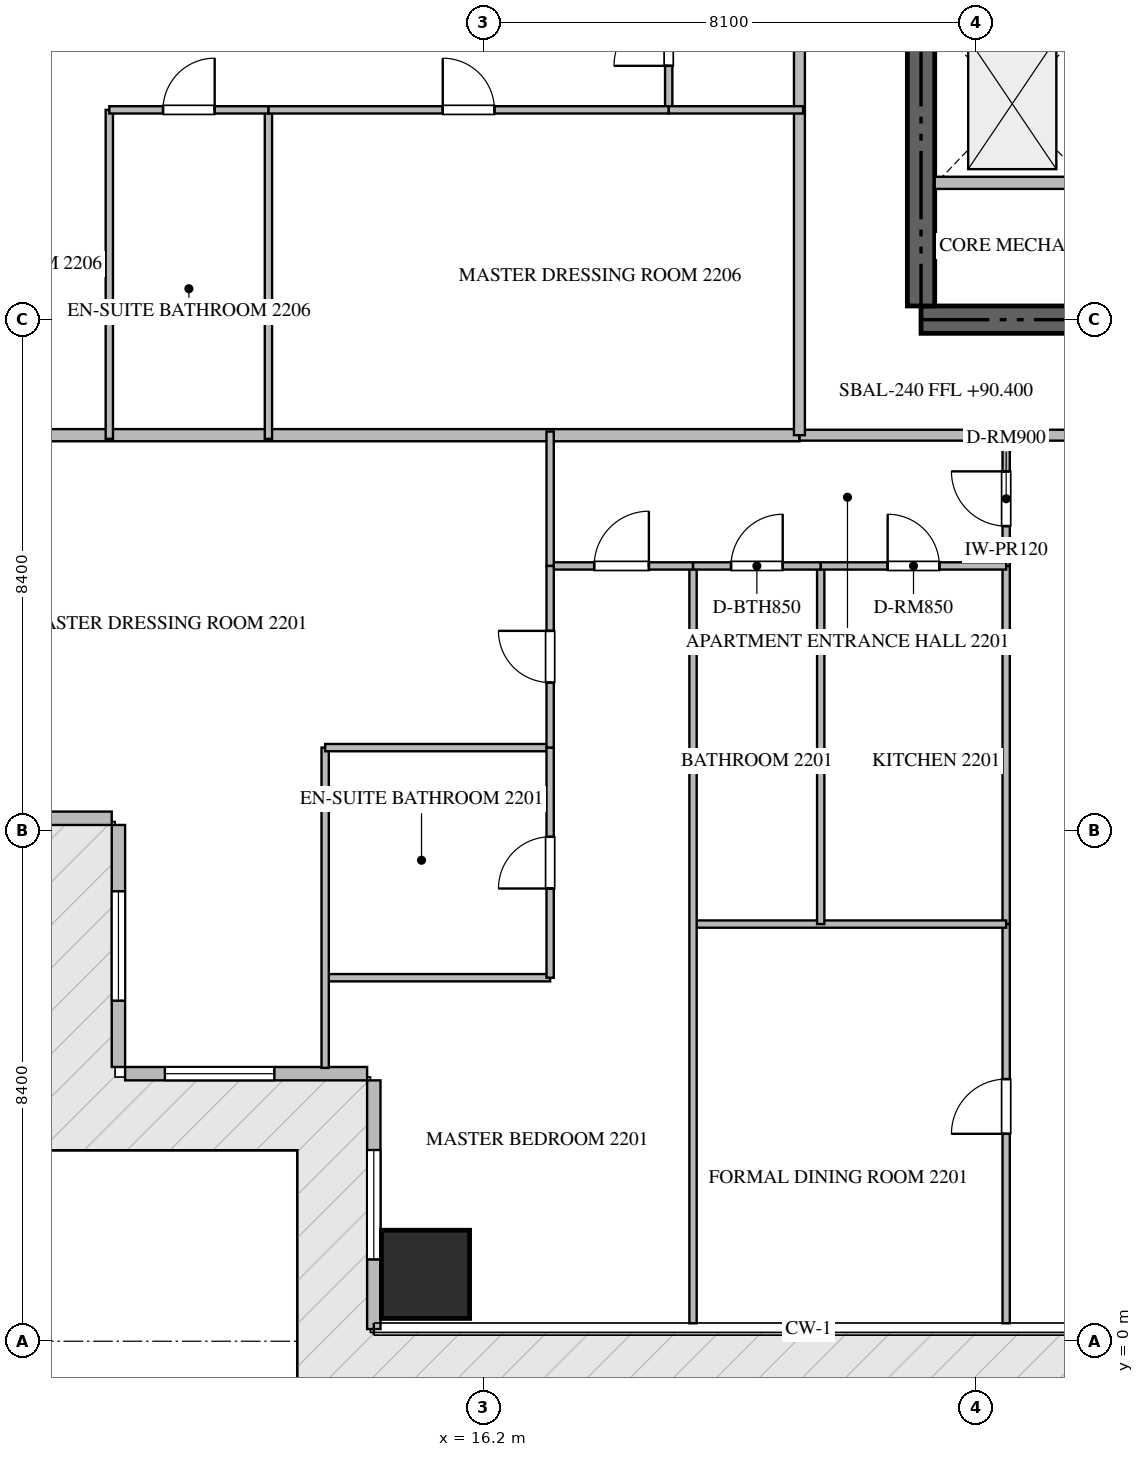
"""IFC4 building model, lengths in metres.
Left out: names, types, materials, properties, quantities, classifications, styles, units other than length and angle.
Written with IfcOpenShell. Run it as: python <this file> out.ifc"""

import sys

from ifc_helpers import new_model, si_unit, direction, frame, frame_2d, origin, origin_2d, place, context, subcontext, project, spatial, rectangle, extrude, source, transform, mapped, element, fill, save


model = new_model("IFC4")
c1 = context("Model", 3, precision=1e-05, world=origin(), true_north=direction((0.0, 1.0)))
c2 = subcontext(c1, "Body", "Model", "MODEL_VIEW")
j1 = project(units=[si_unit("LENGTHUNIT", "METRE"), si_unit("PLANEANGLEUNIT", "RADIAN")], contexts=[c1])
p1 = place(None, origin())
s1 = spatial("IfcSite", under=j1, at=p1, CompositionType="ELEMENT")
p2 = place(p1, origin())
s2 = spatial("IfcBuilding", under=s1, at=p2, CompositionType="ELEMENT")
p3 = place(p2, frame((0.0, 0.0, 90.45)))
s3 = spatial("IfcBuildingStorey", under=s2, at=p3, CompositionType="ELEMENT", Elevation=90.45)
p4 = place(p3, frame((23.4, 16.8, -0.26), z_axis=(0.0, 0.0, 1.0), x_axis=(1.0, 0.0, 0.0)))
e1 = element("IfcWall", 1, at=p4, inside=s3, PredefinedType="SHEAR", context=c2, shape_type="SweptSolid", body=[
    extrude(rectangle(XDim=18.0, YDim=0.45, at=frame_2d((9.0, 0.0))), origin(), (0.0, 0.0, 1.0), 3.748),
])
p5 = place(p3, frame((23.4, 17.025, -0.26), z_axis=(0.0, 0.0, 1.0), x_axis=(0.0, 1.0, 0.0)))
e2 = element("IfcWall", 2, at=p5, inside=s3, PredefinedType="SHEAR", context=c2, shape_type="SweptSolid", body=[
    extrude(rectangle(XDim=4.825, YDim=0.45, at=frame_2d((2.413, 0.0))), origin(), (0.0, 0.0, 1.0), 3.748),
])
m1 = source(origin(), c2, "Body", "SweptSolid", [
    extrude(rectangle(XDim=1.45, YDim=1.45, at=origin_2d()), origin(), (0.0, 0.0, 1.0), 3.75),
])
p6 = place(p3, frame((15.25, 1.1, -0.26), z_axis=(0.0, 0.0, 1.0), x_axis=(1.0, 0.0, 0.0)))
e3 = element("IfcColumn", 3, at=p6, inside=s3, PredefinedType="COLUMN", context=c2, shape_type="MappedRepresentation", body=[
    mapped(m1, transform((0.0, 0.0, 0.0), scale=1.0)),
])
p7 = place(p3, frame((6.0, 8.6, 0.0), z_axis=(0.0, 0.0, 1.0), x_axis=(1.0, 0.0, 0.0)))
e4 = element("IfcWall", 4, at=p7, inside=s3, PredefinedType="ELEMENTEDWALL", context=c2, shape_type="SweptSolid", body=[
    extrude(rectangle(XDim=4.09, YDim=0.22, at=frame_2d((2.045, 0.0))), origin(), (0.0, 0.0, 1.0), 3.475),
])
p8 = place(p7, frame((1.145, 0.0, 0.65)))
e5 = element("IfcOpeningElement", 5, at=p8, cuts=e4, PredefinedType="OPENING", context=c2, shape_type="SweptSolid", body=[
    extrude(rectangle(XDim=1.8, YDim=2.1, at=frame_2d((0.9, 1.05))), frame((0.0, 0.12, 0.0), z_axis=(0.0, -1.0, 0.0), x_axis=(1.0, 0.0, 0.0)), (0.0, 0.0, 1.0), 0.24),
])
p9 = place(p3, frame((10.2, 8.49, 0.0), z_axis=(0.0, 0.0, 1.0), x_axis=(0.0, -1.0, 0.0)))
e6 = element("IfcWall", 6, at=p9, inside=s3, PredefinedType="ELEMENTEDWALL", context=c2, shape_type="SweptSolid", body=[
    extrude(rectangle(XDim=3.98, YDim=0.22, at=frame_2d((1.99, 0.0))), origin(), (0.0, 0.0, 1.0), 3.475),
])
p10 = place(p9, frame((1.09, 0.0, 0.65)))
e7 = element("IfcOpeningElement", 7, at=p10, cuts=e6, PredefinedType="OPENING", context=c2, shape_type="SweptSolid", body=[
    extrude(rectangle(XDim=1.8, YDim=2.1, at=frame_2d((0.9, 1.05))), frame((0.0, 0.12, 0.0), z_axis=(0.0, -1.0, 0.0), x_axis=(1.0, 0.0, 0.0)), (0.0, 0.0, 1.0), 0.24),
])
p11 = place(p3, frame((10.31, 4.4, 0.0), z_axis=(0.0, 0.0, 1.0), x_axis=(1.0, 0.0, 0.0)))
e8 = element("IfcWall", 8, at=p11, inside=s3, PredefinedType="ELEMENTEDWALL", context=c2, shape_type="SweptSolid", body=[
    extrude(rectangle(XDim=3.98, YDim=0.22, at=frame_2d((1.99, 0.0))), origin(), (0.0, 0.0, 1.0), 3.475),
])
p12 = place(p11, frame((0.654, 0.0, 0.65)))
e9 = element("IfcOpeningElement", 9, at=p12, cuts=e8, PredefinedType="OPENING", context=c2, shape_type="SweptSolid", body=[
    extrude(rectangle(XDim=1.8, YDim=2.1, at=frame_2d((0.9, 1.05))), frame((0.0, 0.12, 0.0), z_axis=(0.0, -1.0, 0.0), x_axis=(1.0, 0.0, 0.0)), (0.0, 0.0, 1.0), 0.24),
])
p13 = place(p3, frame((14.4, 4.29, 0.0), z_axis=(0.0, 0.0, 1.0), x_axis=(0.0, -1.0, 0.0)))
e10 = element("IfcWall", 10, at=p13, inside=s3, PredefinedType="ELEMENTEDWALL", context=c2, shape_type="SweptSolid", body=[
    extrude(rectangle(XDim=4.09, YDim=0.22, at=frame_2d((2.045, 0.0))), origin(), (0.0, 0.0, 1.0), 3.475),
])
p14 = place(p13, frame((1.145, 0.0, 0.65)))
e11 = element("IfcOpeningElement", 11, at=p14, cuts=e10, PredefinedType="OPENING", context=c2, shape_type="SweptSolid", body=[
    extrude(rectangle(XDim=1.8, YDim=2.1, at=frame_2d((0.9, 1.05))), frame((0.0, 0.12, 0.0), z_axis=(0.0, -1.0, 0.0), x_axis=(1.0, 0.0, 0.0)), (0.0, 0.0, 1.0), 0.24),
])
p15 = place(p3, frame((23.625, 19.05, 0.0), z_axis=(0.0, 0.0, 1.0), x_axis=(1.0, 0.0, 0.0)))
e12 = element("IfcWall", 12, at=p15, inside=s3, PredefinedType="STANDARD", context=c2, shape_type="SweptSolid", body=[
    extrude(rectangle(XDim=2.425, YDim=0.2, at=frame_2d((1.212, 0.0))), origin(), (0.0, 0.0, 1.0), 3.49),
])
p16 = place(p3, frame((6.082, 14.9, 0.0), z_axis=(0.0, 0.0, 1.0), x_axis=(1.0, 0.0, 0.0)))
e13 = element("IfcWall", 13, at=p16, inside=s3, PredefinedType="PARTITIONING", context=c2, shape_type="SweptSolid", body=[
    extrude(rectangle(XDim=15.318, YDim=0.2, at=frame_2d((7.659, 0.0))), origin(), (0.0, 0.0, 1.0), 3.49),
])
p17 = place(p3, frame((21.402, 14.9, 0.0), z_axis=(0.0, 0.0, 1.0), x_axis=(1.0, 0.0, 0.0)))
e14 = element("IfcWall", 14, at=p17, inside=s3, PredefinedType="PARTITIONING", context=c2, shape_type="SweptSolid", body=[
    extrude(rectangle(XDim=21.996, YDim=0.18, at=frame_2d((10.998, 0.0))), origin(), (0.0, 0.0, 1.0), 3.49),
])
p18 = place(p17, frame((7.202, 0.0, 0.0)))
e15 = element("IfcOpeningElement", 15, at=p18, cuts=e14, PredefinedType="OPENING", context=c2, shape_type="SweptSolid", body=[
    extrude(rectangle(XDim=1.0, YDim=2.15, at=frame_2d((0.5, 1.075))), frame((0.0, 0.1, 0.0), z_axis=(0.0, -1.0, 0.0), x_axis=(1.0, 0.0, 0.0)), (0.0, 0.0, 1.0), 0.2),
])
p19 = place(p3, frame((21.4, 14.9, 0.0), z_axis=(0.0, 0.0, 1.0), x_axis=(0.0, 1.0, 0.0)))
e16 = element("IfcWall", 16, at=p19, inside=s3, PredefinedType="PARTITIONING", context=c2, shape_type="SweptSolid", body=[
    extrude(rectangle(XDim=20.6, YDim=0.18, at=frame_2d((10.3, 0.0))), origin(), (0.0, 0.0, 1.0), 3.49),
])
p20 = place(p19, frame((17.64, 0.0, 0.0)))
e17 = element("IfcOpeningElement", 17, at=p20, cuts=e16, PredefinedType="OPENING", context=c2, shape_type="SweptSolid", body=[
    extrude(rectangle(XDim=1.0, YDim=2.15, at=frame_2d((0.5, 1.075))), frame((0.0, 0.1, 0.0), z_axis=(0.0, -1.0, 0.0), x_axis=(1.0, 0.0, 0.0)), (0.0, 0.0, 1.0), 0.2),
])
p21 = place(p3, frame((24.8, 12.75, 0.0), z_axis=(0.0, 0.0, 1.0), x_axis=(0.0, 1.0, 0.0)))
e18 = element("IfcWall", 18, at=p21, inside=s3, PredefinedType="PARTITIONING", context=c2, shape_type="SweptSolid", body=[
    extrude(rectangle(XDim=2.21, YDim=0.12, at=frame_2d((1.105, 0.0))), origin(), (0.0, 0.0, 1.0), 3.49),
])
p22 = place(p21, frame((0.655, 0.0, 0.0)))
e19 = element("IfcOpeningElement", 19, at=p22, cuts=e18, PredefinedType="OPENING", context=c2, shape_type="SweptSolid", body=[
    extrude(rectangle(XDim=0.9, YDim=2.1, at=frame_2d((0.45, 1.05))), frame((0.0, 0.07, 0.0), z_axis=(0.0, -1.0, 0.0), x_axis=(1.0, 0.0, 0.0)), (0.0, 0.0, 1.0), 0.14),
])
p23 = place(p3, frame((24.8, 0.295, 0.0), z_axis=(0.0, 0.0, 1.0), x_axis=(0.0, 1.0, 0.0)))
e20 = element("IfcWall", 20, at=p23, inside=s3, PredefinedType="PARTITIONING", context=c2, shape_type="SweptSolid", body=[
    extrude(rectangle(XDim=6.565, YDim=0.12, at=frame_2d((3.283, 0.0))), origin(), (0.0, 0.0, 1.0), 3.49),
])
p24 = place(p23, frame((3.116, 0.0, 0.0)))
e21 = element("IfcOpeningElement", 21, at=p24, cuts=e20, PredefinedType="OPENING", context=c2, shape_type="SweptSolid", body=[
    extrude(rectangle(XDim=0.9, YDim=2.1, at=frame_2d((0.45, 1.05))), frame((0.0, 0.07, 0.0), z_axis=(0.0, -1.0, 0.0), x_axis=(1.0, 0.0, 0.0)), (0.0, 0.0, 1.0), 0.14),
])
p25 = place(p3, frame((24.8, 6.862, 0.0), z_axis=(0.0, 0.0, 1.0), x_axis=(0.0, 1.0, 0.0)))
e22 = element("IfcWall", 22, at=p25, inside=s3, PredefinedType="PARTITIONING", context=c2, shape_type="SweptSolid", body=[
    extrude(rectangle(XDim=5.886, YDim=0.12, at=frame_2d((2.943, 0.0))), origin(), (0.0, 0.0, 1.0), 3.49),
])
p26 = place(p3, frame((19.65, 6.86, 0.0), z_axis=(0.0, 0.0, 1.0), x_axis=(1.0, 0.0, 0.0)))
e23 = element("IfcWall", 23, at=p26, inside=s3, PredefinedType="PARTITIONING", context=c2, shape_type="SweptSolid", body=[
    extrude(rectangle(XDim=5.15, YDim=0.12, at=frame_2d((2.575, 0.0))), origin(), (0.0, 0.0, 1.0), 3.49),
])
p27 = place(p3, frame((19.65, 0.295, 0.0), z_axis=(0.0, 0.0, 1.0), x_axis=(0.0, 1.0, 0.0)))
e24 = element("IfcWall", 24, at=p27, inside=s3, PredefinedType="PARTITIONING", context=c2, shape_type="SweptSolid", body=[
    extrude(rectangle(XDim=12.455, YDim=0.12, at=frame_2d((6.228, 0.0))), origin(), (0.0, 0.0, 1.0), 3.49),
])
p28 = place(p3, frame((21.75, 6.86, 0.0), z_axis=(0.0, 0.0, 1.0), x_axis=(0.0, 1.0, 0.0)))
e25 = element("IfcWall", 25, at=p28, inside=s3, PredefinedType="PARTITIONING", context=c2, shape_type="SweptSolid", body=[
    extrude(rectangle(XDim=5.89, YDim=0.12, at=frame_2d((2.945, 0.0))), origin(), (0.0, 0.0, 1.0), 3.49),
])
p29 = place(p3, frame((19.65, 12.75, 0.0), z_axis=(0.0, 0.0, 1.0), x_axis=(1.0, 0.0, 0.0)))
e26 = element("IfcWall", 26, at=p29, inside=s3, PredefinedType="PARTITIONING", context=c2, shape_type="SweptSolid", body=[
    extrude(rectangle(XDim=2.1, YDim=0.12, at=frame_2d((1.05, 0.0))), origin(), (0.0, 0.0, 1.0), 3.49),
])
p30 = place(p29, frame((0.625, 0.0, 0.0)))
e27 = element("IfcOpeningElement", 27, at=p30, cuts=e26, PredefinedType="OPENING", context=c2, shape_type="SweptSolid", body=[
    extrude(rectangle(XDim=0.85, YDim=2.1, at=frame_2d((0.425, 1.05))), frame((0.0, 0.07, 0.0), z_axis=(0.0, -1.0, 0.0), x_axis=(1.0, 0.0, 0.0)), (0.0, 0.0, 1.0), 0.14),
])
p31 = place(p3, frame((21.752, 12.75, 0.0), z_axis=(0.0, 0.0, 1.0), x_axis=(1.0, 0.0, 0.0)))
e28 = element("IfcWall", 28, at=p31, inside=s3, PredefinedType="PARTITIONING", context=c2, shape_type="SweptSolid", body=[
    extrude(rectangle(XDim=3.048, YDim=0.12, at=frame_2d((1.524, 0.0))), origin(), (0.0, 0.0, 1.0), 3.49),
])
p32 = place(p31, frame((1.099, 0.0, 0.0)))
e29 = element("IfcOpeningElement", 29, at=p32, cuts=e28, PredefinedType="OPENING", context=c2, shape_type="SweptSolid", body=[
    extrude(rectangle(XDim=0.85, YDim=2.1, at=frame_2d((0.425, 1.05))), frame((0.0, 0.07, 0.0), z_axis=(0.0, -1.0, 0.0), x_axis=(1.0, 0.0, 0.0)), (0.0, 0.0, 1.0), 0.14),
])
p33 = place(p3, frame((17.3, 12.75, 0.0), z_axis=(0.0, 0.0, 1.0), x_axis=(1.0, 0.0, 0.0)))
e30 = element("IfcWall", 30, at=p33, inside=s3, PredefinedType="PARTITIONING", context=c2, shape_type="SweptSolid", body=[
    extrude(rectangle(XDim=2.348, YDim=0.12, at=frame_2d((1.174, 0.0))), origin(), (0.0, 0.0, 1.0), 3.49),
])
p34 = place(p33, frame((0.724, 0.0, 0.0)))
e31 = element("IfcOpeningElement", 31, at=p34, cuts=e30, PredefinedType="OPENING", context=c2, shape_type="SweptSolid", body=[
    extrude(rectangle(XDim=0.9, YDim=2.1, at=frame_2d((0.45, 1.05))), frame((0.0, 0.07, 0.0), z_axis=(0.0, -1.0, 0.0), x_axis=(1.0, 0.0, 0.0)), (0.0, 0.0, 1.0), 0.14),
])
p35 = place(p3, frame((13.6, 5.978, 0.0), z_axis=(0.0, 0.0, 1.0), x_axis=(1.0, 0.0, 0.0)))
e32 = element("IfcWall", 32, at=p35, inside=s3, PredefinedType="PARTITIONING", context=c2, shape_type="SweptSolid", body=[
    extrude(rectangle(XDim=3.7, YDim=0.12, at=frame_2d((1.85, 0.0))), origin(), (0.0, 0.0, 1.0), 3.49),
])
p36 = place(p3, frame((13.6, 4.495, 0.0), z_axis=(0.0, 0.0, 1.0), x_axis=(0.0, 1.0, 0.0)))
e33 = element("IfcWall", 33, at=p36, inside=s3, PredefinedType="PARTITIONING", context=c2, shape_type="SweptSolid", body=[
    extrude(rectangle(XDim=5.267, YDim=0.12, at=frame_2d((2.633, 0.0))), origin(), (0.0, 0.0, 1.0), 3.49),
])
p37 = place(p3, frame((13.6, 9.762, 0.0), z_axis=(0.0, 0.0, 1.0), x_axis=(1.0, 0.0, 0.0)))
e34 = element("IfcWall", 34, at=p37, inside=s3, PredefinedType="PARTITIONING", context=c2, shape_type="SweptSolid", body=[
    extrude(rectangle(XDim=3.7, YDim=0.12, at=frame_2d((1.85, 0.0))), origin(), (0.0, 0.0, 1.0), 3.49),
])
p38 = place(p3, frame((17.3, 5.978, 0.0), z_axis=(0.0, 0.0, 1.0), x_axis=(0.0, 1.0, 0.0)))
e35 = element("IfcWall", 35, at=p38, inside=s3, PredefinedType="PARTITIONING", context=c2, shape_type="SweptSolid", body=[
    extrude(rectangle(XDim=3.784, YDim=0.12, at=frame_2d((1.892, 0.0))), origin(), (0.0, 0.0, 1.0), 3.49),
])
p39 = place(p38, frame((1.467, 0.0, 0.0)))
e36 = element("IfcOpeningElement", 36, at=p39, cuts=e35, PredefinedType="OPENING", context=c2, shape_type="SweptSolid", body=[
    extrude(rectangle(XDim=0.85, YDim=2.1, at=frame_2d((0.425, 1.05))), frame((0.0, 0.07, 0.0), z_axis=(0.0, -1.0, 0.0), x_axis=(1.0, 0.0, 0.0)), (0.0, 0.0, 1.0), 0.14),
])
p40 = place(p3, frame((17.3, 9.764, 0.0), z_axis=(0.0, 0.0, 1.0), x_axis=(0.0, 1.0, 0.0)))
e37 = element("IfcWall", 37, at=p40, inside=s3, PredefinedType="PARTITIONING", context=c2, shape_type="SweptSolid", body=[
    extrude(rectangle(XDim=2.986, YDim=0.12, at=frame_2d((1.493, 0.0))), origin(), (0.0, 0.0, 1.0), 3.49),
])
p41 = place(p40, frame((1.068, 0.0, 0.0)))
e38 = element("IfcOpeningElement", 38, at=p41, cuts=e37, PredefinedType="OPENING", context=c2, shape_type="SweptSolid", body=[
    extrude(rectangle(XDim=0.85, YDim=2.1, at=frame_2d((0.425, 1.05))), frame((0.0, 0.07, 0.0), z_axis=(0.0, -1.0, 0.0), x_axis=(1.0, 0.0, 0.0)), (0.0, 0.0, 1.0), 0.14),
])
p42 = place(p3, frame((17.3, 12.752, 0.0), z_axis=(0.0, 0.0, 1.0), x_axis=(0.0, 1.0, 0.0)))
e39 = element("IfcWall", 39, at=p42, inside=s3, PredefinedType="PARTITIONING", context=c2, shape_type="SweptSolid", body=[
    extrude(rectangle(XDim=2.208, YDim=0.12, at=frame_2d((1.104, 0.0))), origin(), (0.0, 0.0, 1.0), 3.49),
])
p43 = place(p3, frame((19.25, 20.25, 0.0), z_axis=(0.0, 0.0, 1.0), x_axis=(0.0, 1.0, 0.0)))
e40 = element("IfcWall", 40, at=p43, inside=s3, PredefinedType="PARTITIONING", context=c2, shape_type="SweptSolid", body=[
    extrude(rectangle(XDim=2.348, YDim=0.12, at=frame_2d((1.174, 0.0))), origin(), (0.0, 0.0, 1.0), 3.49),
])
p44 = place(p43, frame((0.724, 0.0, 0.0)))
e41 = element("IfcOpeningElement", 41, at=p44, cuts=e40, PredefinedType="OPENING", context=c2, shape_type="SweptSolid", body=[
    extrude(rectangle(XDim=0.9, YDim=2.1, at=frame_2d((0.45, 1.05))), frame((0.0, 0.07, 0.0), z_axis=(0.0, -1.0, 0.0), x_axis=(1.0, 0.0, 0.0)), (0.0, 0.0, 1.0), 0.14),
])
for number, where, z_axis, x_axis in (
    (42, (10.05, 14.84, 0.0), (0.0, 0.0, 1.0), (0.0, 1.0, 0.0)),
    (43, (12.667, 14.84, 0.0), (0.0, 0.0, 1.0), (0.0, 1.0, 0.0)),
):
    element("IfcWall", number, at=place(p3, frame(where, z_axis=z_axis, x_axis=x_axis)), inside=s3, PredefinedType="PARTITIONING", context=c2, shape_type="SweptSolid", body=[
        extrude(rectangle(XDim=5.41, YDim=0.12, at=frame_2d((2.705, 0.0))), origin(), (0.0, 0.0, 1.0), 3.49),
    ])
p45 = place(p3, frame((10.05, 20.25, 0.0), z_axis=(0.0, 0.0, 1.0), x_axis=(1.0, 0.0, 0.0)))
e44 = element("IfcWall", 44, at=p45, inside=s3, PredefinedType="PARTITIONING", context=c2, shape_type="SweptSolid", body=[
    extrude(rectangle(XDim=2.617, YDim=0.12, at=frame_2d((1.309, 0.0))), origin(), (0.0, 0.0, 1.0), 3.49),
])
p46 = place(p45, frame((0.883, 0.0, 0.0)))
e45 = element("IfcOpeningElement", 45, at=p46, cuts=e44, PredefinedType="OPENING", context=c2, shape_type="SweptSolid", body=[
    extrude(rectangle(XDim=0.85, YDim=2.1, at=frame_2d((0.425, 1.05))), frame((0.0, 0.07, 0.0), z_axis=(0.0, -1.0, 0.0), x_axis=(1.0, 0.0, 0.0)), (0.0, 0.0, 1.0), 0.14),
])
p47 = place(p3, frame((12.669, 20.25, 0.0), z_axis=(0.0, 0.0, 1.0), x_axis=(1.0, 0.0, 0.0)))
e46 = element("IfcWall", 46, at=p47, inside=s3, PredefinedType="PARTITIONING", context=c2, shape_type="SweptSolid", body=[
    extrude(rectangle(XDim=6.581, YDim=0.12, at=frame_2d((3.291, 0.0))), origin(), (0.0, 0.0, 1.0), 3.49),
])
p48 = place(p47, frame((2.865, 0.0, 0.0)))
e47 = element("IfcOpeningElement", 47, at=p48, cuts=e46, PredefinedType="OPENING", context=c2, shape_type="SweptSolid", body=[
    extrude(rectangle(XDim=0.85, YDim=2.1, at=frame_2d((0.425, 1.05))), frame((0.0, 0.07, 0.0), z_axis=(0.0, -1.0, 0.0), x_axis=(1.0, 0.0, 0.0)), (0.0, 0.0, 1.0), 0.14),
])
p49 = place(p3, frame((19.252, 20.25, 0.0), z_axis=(0.0, 0.0, 1.0), x_axis=(1.0, 0.0, 0.0)))
e48 = element("IfcWall", 48, at=p49, inside=s3, PredefinedType="PARTITIONING", context=c2, shape_type="SweptSolid", body=[
    extrude(rectangle(XDim=2.208, YDim=0.12, at=frame_2d((1.104, 0.0))), origin(), (0.0, 0.0, 1.0), 3.49),
])
m2 = source(origin(), c2, "Body", "SweptSolid", [
    extrude(rectangle(XDim=1.8, YDim=2.1, at=frame_2d((0.9, 1.05))), frame((0.0, 0.03, 0.0), z_axis=(0.0, -1.0, 0.0), x_axis=(1.0, 0.0, 0.0)), (0.0, 0.0, 1.0), 0.06),
])
p50 = place(p10, origin())
e49 = element("IfcWindow", 49, at=p50, inside=s3, PartitioningType="SINGLE_PANEL", PredefinedType="WINDOW", context=c2, shape_type="MappedRepresentation", body=[
    mapped(m2, transform((0.0, 0.0, 0.0), scale=1.0)),
])
fill(e7, e49)
p51 = place(p12, origin())
e50 = element("IfcWindow", 50, at=p51, inside=s3, PartitioningType="SINGLE_PANEL", PredefinedType="WINDOW", context=c2, shape_type="MappedRepresentation", body=[
    mapped(m2, transform((0.0, 0.0, 0.0), scale=1.0)),
])
fill(e9, e50)
p52 = place(p14, origin())
e51 = element("IfcWindow", 51, at=p52, inside=s3, PartitioningType="SINGLE_PANEL", PredefinedType="WINDOW", context=c2, shape_type="MappedRepresentation", body=[
    mapped(m2, transform((0.0, 0.0, 0.0), scale=1.0)),
])
fill(e11, e51)
m3 = source(origin(), c2, "Body", "SweptSolid", [
    extrude(rectangle(XDim=0.9, YDim=2.1, at=frame_2d((0.45, 1.05))), frame((0.0, 0.025, 0.0), z_axis=(0.0, -1.0, 0.0), x_axis=(1.0, 0.0, 0.0)), (0.0, 0.0, 1.0), 0.05),
])
p53 = place(p22, origin())
e52 = element("IfcDoor", 52, at=p53, inside=s3, OperationType="SINGLE_SWING_RIGHT", PredefinedType="DOOR", context=c2, shape_type="MappedRepresentation", body=[
    mapped(m3, transform((0.0, 0.0, 0.0), scale=1.0)),
])
fill(e19, e52)
p54 = place(p24, origin())
e53 = element("IfcDoor", 53, at=p54, inside=s3, OperationType="SINGLE_SWING_LEFT", PredefinedType="DOOR", context=c2, shape_type="MappedRepresentation", body=[
    mapped(m3, transform((0.0, 0.0, 0.0), scale=1.0)),
])
fill(e21, e53)
m4 = source(origin(), c2, "Body", "SweptSolid", [
    extrude(rectangle(XDim=0.85, YDim=2.1, at=frame_2d((0.425, 1.05))), frame((0.0, 0.025, 0.0), z_axis=(0.0, -1.0, 0.0), x_axis=(1.0, 0.0, 0.0)), (0.0, 0.0, 1.0), 0.05),
])
p55 = place(p30, origin())
e54 = element("IfcDoor", 54, at=p55, inside=s3, OperationType="SINGLE_SWING_RIGHT", PredefinedType="DOOR", context=c2, shape_type="MappedRepresentation", body=[
    mapped(m4, transform((0.0, 0.0, 0.0), scale=1.0)),
])
fill(e27, e54)
p56 = place(p32, origin())
e55 = element("IfcDoor", 55, at=p56, inside=s3, OperationType="SINGLE_SWING_LEFT", PredefinedType="DOOR", context=c2, shape_type="MappedRepresentation", body=[
    mapped(m4, transform((0.0, 0.0, 0.0), scale=1.0)),
])
fill(e29, e55)
p57 = place(p34, origin())
e56 = element("IfcDoor", 56, at=p57, inside=s3, OperationType="SINGLE_SWING_RIGHT", PredefinedType="DOOR", context=c2, shape_type="MappedRepresentation", body=[
    mapped(m3, transform((0.0, 0.0, 0.0), scale=1.0)),
])
fill(e31, e56)
p58 = place(p39, origin())
e57 = element("IfcDoor", 57, at=p58, inside=s3, OperationType="SINGLE_SWING_LEFT", PredefinedType="DOOR", context=c2, shape_type="MappedRepresentation", body=[
    mapped(m4, transform((0.0, 0.0, 0.0), scale=1.0)),
])
fill(e36, e57)
p59 = place(p41, origin())
e58 = element("IfcDoor", 58, at=p59, inside=s3, OperationType="SINGLE_SWING_RIGHT", PredefinedType="DOOR", context=c2, shape_type="MappedRepresentation", body=[
    mapped(m4, transform((0.0, 0.0, 0.0), scale=1.0)),
])
fill(e38, e58)
p60 = place(p44, origin())
e59 = element("IfcDoor", 59, at=p60, inside=s3, OperationType="SINGLE_SWING_LEFT", PredefinedType="DOOR", context=c2, shape_type="MappedRepresentation", body=[
    mapped(m3, transform((0.0, 0.0, 0.0), scale=1.0)),
])
fill(e41, e59)
p61 = place(p46, origin())
e60 = element("IfcDoor", 60, at=p61, inside=s3, OperationType="SINGLE_SWING_RIGHT", PredefinedType="DOOR", context=c2, shape_type="MappedRepresentation", body=[
    mapped(m4, transform((0.0, 0.0, 0.0), scale=1.0)),
])
fill(e45, e60)
p62 = place(p48, origin())
e61 = element("IfcDoor", 61, at=p62, inside=s3, OperationType="SINGLE_SWING_LEFT", PredefinedType="DOOR", context=c2, shape_type="MappedRepresentation", body=[
    mapped(m4, transform((0.0, 0.0, 0.0), scale=1.0)),
])
fill(e47, e61)
save(model, sys.argv[1])
